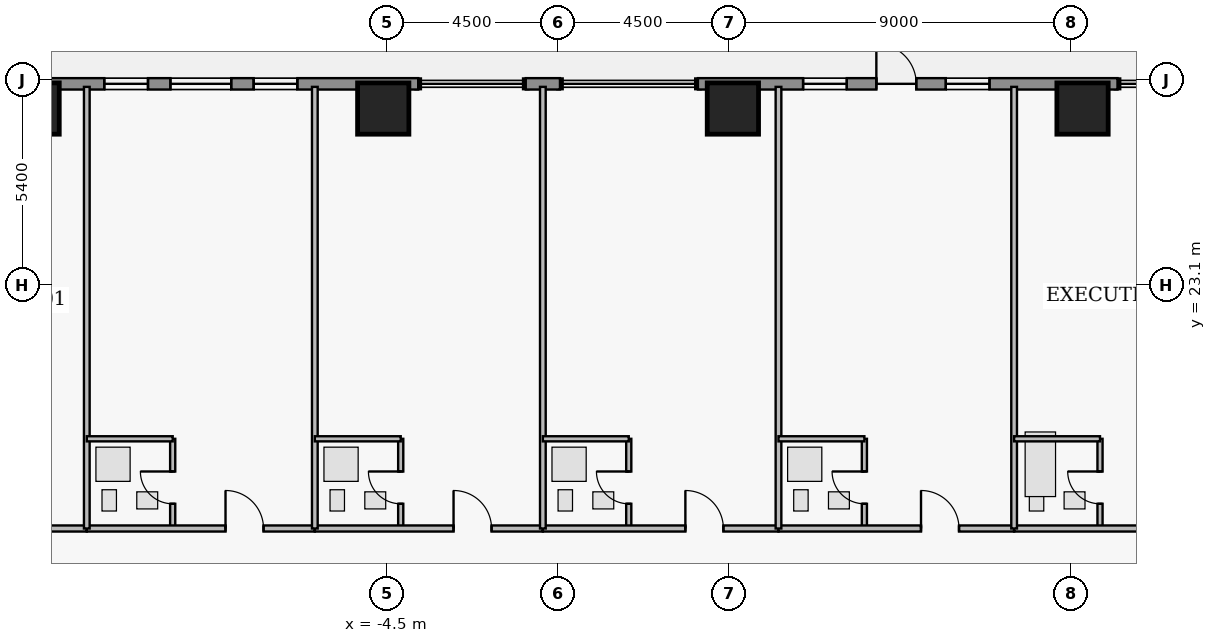
"""IFC4 building model, lengths in metres.
Left out: names, types, materials, properties, quantities, classifications, styles, units other than length and angle.
Written with IfcOpenShell. Run it as: python <this file> out.ifc"""

import sys

from ifc_helpers import new_model, si_unit, direction, frame, frame_2d, origin, origin_2d, place, context, subcontext, project, spatial, rectangle, extrude, element, fill, save


model = new_model("IFC4")
c1 = context("Model", 3, precision=1e-05, world=origin(), true_north=direction((0.0, 1.0)))
c2 = subcontext(c1, "Body", "Model", "MODEL_VIEW")
j1 = project(units=[si_unit("LENGTHUNIT", "METRE"), si_unit("PLANEANGLEUNIT", "RADIAN")], contexts=[c1])
p1 = place(None, origin())
s1 = spatial("IfcSite", under=j1, at=p1, CompositionType="ELEMENT")
p2 = place(p1, origin())
s2 = spatial("IfcBuilding", under=s1, at=p2, CompositionType="ELEMENT")
p3 = place(p2, frame((0.0, 0.0, 99.3)))
s3 = spatial("IfcBuildingStorey", under=s2, at=p3, CompositionType="ELEMENT", Elevation=99.3)
for number, where, z_axis, x_axis in (
    (1, (-13.8, 27.75, 0.0), (0.0, 0.0, 1.0), (1.0, 0.0, 0.0)),
    (2, (-4.6, 27.75, 0.0), (0.0, 0.0, 1.0), (1.0, 0.0, 0.0)),
    (3, (4.6, 27.75, 0.0), (0.0, 0.0, 1.0), (1.0, 0.0, 0.0)),
    (4, (13.8, 27.75, 0.0), (0.0, 0.0, 1.0), (1.0, 0.0, 0.0)),
):
    element("IfcColumn", number, at=place(p3, frame(where, z_axis=z_axis, x_axis=x_axis)), inside=s3, PredefinedType="COLUMN", context=c2, shape_type="SweptSolid", body=[
        extrude(rectangle(XDim=1.35, YDim=1.35, at=origin_2d()), origin(), (0.0, 0.0, 1.0), 3.65),
    ])
p4 = place(p3, frame((-14.72, 28.4, 0.0), z_axis=(0.0, 0.0, 1.0), x_axis=(1.0, 0.0, 0.0)))
e5 = element("IfcWall", 5, at=p4, inside=s3, PredefinedType="STANDARD", context=c2, shape_type="SweptSolid", body=[
    extrude(rectangle(XDim=11.04, YDim=0.3, at=frame_2d((5.52, 0.0))), origin(), (0.0, 0.0, 1.0), 3.43),
])
p5 = place(p4, frame((4.52, 0.0, 0.85)))
e6 = element("IfcOpeningElement", 6, at=p5, cuts=e5, PredefinedType="OPENING", context=c2, shape_type="SweptSolid", body=[
    extrude(rectangle(XDim=1.6, YDim=1.8, at=frame_2d((0.8, 0.9))), frame((0.0, 0.16, 0.0), z_axis=(0.0, -1.0, 0.0), x_axis=(1.0, 0.0, 0.0)), (0.0, 0.0, 1.0), 0.32),
])
p6 = place(p4, frame((2.78, 0.0, 0.95)))
e7 = element("IfcOpeningElement", 7, at=p6, cuts=e5, PredefinedType="OPENING", context=c2, shape_type="SweptSolid", body=[
    extrude(rectangle(XDim=1.15, YDim=1.55, at=frame_2d((0.575, 0.775))), frame((0.0, 0.16, 0.0), z_axis=(0.0, -1.0, 0.0), x_axis=(1.0, 0.0, 0.0)), (0.0, 0.0, 1.0), 0.32),
])
p7 = place(p4, frame((6.71, 0.0, 0.95)))
e8 = element("IfcOpeningElement", 8, at=p7, cuts=e5, PredefinedType="OPENING", context=c2, shape_type="SweptSolid", body=[
    extrude(rectangle(XDim=1.15, YDim=1.55, at=frame_2d((0.575, 0.775))), frame((0.0, 0.16, 0.0), z_axis=(0.0, -1.0, 0.0), x_axis=(1.0, 0.0, 0.0)), (0.0, 0.0, 1.0), 0.32),
])
p8 = place(p3, frame((-0.85, 28.4, 0.0), z_axis=(0.0, 0.0, 1.0), x_axis=(1.0, 0.0, 0.0)))
e9 = element("IfcWall", 9, at=p8, inside=s3, PredefinedType="STANDARD", context=c2, shape_type="SweptSolid", body=[
    extrude(rectangle(XDim=0.9, YDim=0.3, at=frame_2d((0.45, 0.0))), origin(), (0.0, 0.0, 1.0), 3.43),
])
p9 = place(p3, frame((3.68, 28.4, 0.0), z_axis=(0.0, 0.0, 1.0), x_axis=(1.0, 0.0, 0.0)))
e10 = element("IfcWall", 10, at=p9, inside=s3, PredefinedType="STANDARD", context=c2, shape_type="SweptSolid", body=[
    extrude(rectangle(XDim=11.04, YDim=0.3, at=frame_2d((5.52, 0.0))), origin(), (0.0, 0.0, 1.0), 3.43),
])
p10 = place(p9, frame((4.695, 0.0, 0.0)))
e11 = element("IfcOpeningElement", 11, at=p10, cuts=e10, PredefinedType="OPENING", context=c2, shape_type="SweptSolid", body=[
    extrude(rectangle(XDim=1.05, YDim=2.2, at=frame_2d((0.525, 1.1))), frame((0.0, 0.16, 0.0), z_axis=(0.0, -1.0, 0.0), x_axis=(1.0, 0.0, 0.0)), (0.0, 0.0, 1.0), 0.32),
])
p11 = place(p9, frame((2.768, 0.0, 0.95)))
e12 = element("IfcOpeningElement", 12, at=p11, cuts=e10, PredefinedType="OPENING", context=c2, shape_type="SweptSolid", body=[
    extrude(rectangle(XDim=1.15, YDim=1.55, at=frame_2d((0.575, 0.775))), frame((0.0, 0.16, 0.0), z_axis=(0.0, -1.0, 0.0), x_axis=(1.0, 0.0, 0.0)), (0.0, 0.0, 1.0), 0.32),
])
p12 = place(p9, frame((6.522, 0.0, 0.95)))
e13 = element("IfcOpeningElement", 13, at=p12, cuts=e10, PredefinedType="OPENING", context=c2, shape_type="SweptSolid", body=[
    extrude(rectangle(XDim=1.15, YDim=1.55, at=frame_2d((0.575, 0.775))), frame((0.0, 0.16, 0.0), z_axis=(0.0, -1.0, 0.0), x_axis=(1.0, 0.0, 0.0)), (0.0, 0.0, 1.0), 0.32),
])
p13 = place(p3, frame((-20.6, 16.7, 0.0), z_axis=(0.0, 0.0, 1.0), x_axis=(1.0, 0.0, 0.0)))
e14 = element("IfcWall", 14, at=p13, inside=s3, PredefinedType="PARTITIONING", context=c2, shape_type="SweptSolid", body=[
    extrude(rectangle(XDim=8.2, YDim=0.16, at=frame_2d((4.1, 0.0))), origin(), (0.0, 0.0, 1.0), 2.973),
])
p14 = place(p13, frame((4.75, 0.0, 0.0)))
e15 = element("IfcOpeningElement", 15, at=p14, cuts=e14, PredefinedType="OPENING", context=c2, shape_type="SweptSolid", body=[
    extrude(rectangle(XDim=1.0, YDim=2.15, at=frame_2d((0.5, 1.075))), frame((0.0, 0.09, 0.0), z_axis=(0.0, -1.0, 0.0), x_axis=(1.0, 0.0, 0.0)), (0.0, 0.0, 1.0), 0.18),
])
p15 = place(p3, frame((-10.14, 16.7, 0.0), z_axis=(0.0, 0.0, 1.0), x_axis=(0.0, 1.0, 0.0)))
e16 = element("IfcWall", 16, at=p15, inside=s3, PredefinedType="PLUMBINGWALL", context=c2, shape_type="SweptSolid", body=[
    extrude(rectangle(XDim=2.36, YDim=0.135, at=frame_2d((1.18, 0.0))), origin(), (0.0, 0.0, 1.0), 3.43),
])
p16 = place(p15, frame((0.65, 0.0, 0.0)))
e17 = element("IfcOpeningElement", 17, at=p16, cuts=e16, PredefinedType="OPENING", context=c2, shape_type="SweptSolid", body=[
    extrude(rectangle(XDim=0.85, YDim=2.1, at=frame_2d((0.425, 1.05))), frame((0.0, 0.077, 0.0), z_axis=(0.0, -1.0, 0.0), x_axis=(1.0, 0.0, 0.0)), (0.0, 0.0, 1.0), 0.155),
])
p17 = place(p3, frame((-12.4, 16.7, 0.0), z_axis=(0.0, 0.0, 1.0), x_axis=(1.0, 0.0, 0.0)))
e18 = element("IfcWall", 18, at=p17, inside=s3, PredefinedType="PARTITIONING", context=c2, shape_type="SweptSolid", body=[
    extrude(rectangle(XDim=6.0, YDim=0.16, at=frame_2d((3.0, 0.0))), origin(), (0.0, 0.0, 1.0), 2.973),
])
p18 = place(p17, frame((3.65, 0.0, 0.0)))
e19 = element("IfcOpeningElement", 19, at=p18, cuts=e18, PredefinedType="OPENING", context=c2, shape_type="SweptSolid", body=[
    extrude(rectangle(XDim=1.0, YDim=2.15, at=frame_2d((0.5, 1.075))), frame((0.0, 0.09, 0.0), z_axis=(0.0, -1.0, 0.0), x_axis=(1.0, 0.0, 0.0)), (0.0, 0.0, 1.0), 0.18),
])
p19 = place(p3, frame((-4.14, 16.7, 0.0), z_axis=(0.0, 0.0, 1.0), x_axis=(0.0, 1.0, 0.0)))
e20 = element("IfcWall", 20, at=p19, inside=s3, PredefinedType="PLUMBINGWALL", context=c2, shape_type="SweptSolid", body=[
    extrude(rectangle(XDim=2.36, YDim=0.135, at=frame_2d((1.18, 0.0))), origin(), (0.0, 0.0, 1.0), 2.503),
])
p20 = place(p19, frame((0.65, 0.0, 0.0)))
e21 = element("IfcOpeningElement", 21, at=p20, cuts=e20, PredefinedType="OPENING", context=c2, shape_type="SweptSolid", body=[
    extrude(rectangle(XDim=0.85, YDim=2.1, at=frame_2d((0.425, 1.05))), frame((0.0, 0.077, 0.0), z_axis=(0.0, -1.0, 0.0), x_axis=(1.0, 0.0, 0.0)), (0.0, 0.0, 1.0), 0.155),
])
p21 = place(p3, frame((-6.4, 16.7, 0.0), z_axis=(0.0, 0.0, 1.0), x_axis=(1.0, 0.0, 0.0)))
e22 = element("IfcWall", 22, at=p21, inside=s3, PredefinedType="PARTITIONING", context=c2, shape_type="SweptSolid", body=[
    extrude(rectangle(XDim=6.0, YDim=0.16, at=frame_2d((3.0, 0.0))), origin(), (0.0, 0.0, 1.0), 2.973),
])
p22 = place(p21, frame((3.65, 0.0, 0.0)))
e23 = element("IfcOpeningElement", 23, at=p22, cuts=e22, PredefinedType="OPENING", context=c2, shape_type="SweptSolid", body=[
    extrude(rectangle(XDim=1.0, YDim=2.15, at=frame_2d((0.5, 1.075))), frame((0.0, 0.09, 0.0), z_axis=(0.0, -1.0, 0.0), x_axis=(1.0, 0.0, 0.0)), (0.0, 0.0, 1.0), 0.18),
])
p23 = place(p3, frame((1.86, 16.7, 0.0), z_axis=(0.0, 0.0, 1.0), x_axis=(0.0, 1.0, 0.0)))
e24 = element("IfcWall", 24, at=p23, inside=s3, PredefinedType="PLUMBINGWALL", context=c2, shape_type="SweptSolid", body=[
    extrude(rectangle(XDim=2.36, YDim=0.135, at=frame_2d((1.18, 0.0))), origin(), (0.0, 0.0, 1.0), 3.43),
])
p24 = place(p23, frame((0.65, 0.0, 0.0)))
e25 = element("IfcOpeningElement", 25, at=p24, cuts=e24, PredefinedType="OPENING", context=c2, shape_type="SweptSolid", body=[
    extrude(rectangle(XDim=0.85, YDim=2.1, at=frame_2d((0.425, 1.05))), frame((0.0, 0.077, 0.0), z_axis=(0.0, -1.0, 0.0), x_axis=(1.0, 0.0, 0.0)), (0.0, 0.0, 1.0), 0.155),
])
p25 = place(p3, frame((-0.4, 16.7, 0.0), z_axis=(0.0, 0.0, 1.0), x_axis=(1.0, 0.0, 0.0)))
e26 = element("IfcWall", 26, at=p25, inside=s3, PredefinedType="PARTITIONING", context=c2, shape_type="SweptSolid", body=[
    extrude(rectangle(XDim=6.2, YDim=0.16, at=frame_2d((3.1, 0.0))), origin(), (0.0, 0.0, 1.0), 2.973),
])
p26 = place(p25, frame((3.75, 0.0, 0.0)))
e27 = element("IfcOpeningElement", 27, at=p26, cuts=e26, PredefinedType="OPENING", context=c2, shape_type="SweptSolid", body=[
    extrude(rectangle(XDim=1.0, YDim=2.15, at=frame_2d((0.5, 1.075))), frame((0.0, 0.09, 0.0), z_axis=(0.0, -1.0, 0.0), x_axis=(1.0, 0.0, 0.0)), (0.0, 0.0, 1.0), 0.18),
])
p27 = place(p3, frame((8.06, 16.7, 0.0), z_axis=(0.0, 0.0, 1.0), x_axis=(0.0, 1.0, 0.0)))
e28 = element("IfcWall", 28, at=p27, inside=s3, PredefinedType="PLUMBINGWALL", context=c2, shape_type="SweptSolid", body=[
    extrude(rectangle(XDim=2.36, YDim=0.135, at=frame_2d((1.18, 0.0))), origin(), (0.0, 0.0, 1.0), 3.43),
])
p28 = place(p27, frame((0.65, 0.0, 0.0)))
e29 = element("IfcOpeningElement", 29, at=p28, cuts=e28, PredefinedType="OPENING", context=c2, shape_type="SweptSolid", body=[
    extrude(rectangle(XDim=0.85, YDim=2.1, at=frame_2d((0.425, 1.05))), frame((0.0, 0.077, 0.0), z_axis=(0.0, -1.0, 0.0), x_axis=(1.0, 0.0, 0.0)), (0.0, 0.0, 1.0), 0.155),
])
p29 = place(p3, frame((5.8, 16.7, 0.0), z_axis=(0.0, 0.0, 1.0), x_axis=(1.0, 0.0, 0.0)))
e30 = element("IfcWall", 30, at=p29, inside=s3, PredefinedType="PARTITIONING", context=c2, shape_type="SweptSolid", body=[
    extrude(rectangle(XDim=6.2, YDim=0.16, at=frame_2d((3.1, 0.0))), origin(), (0.0, 0.0, 1.0), 2.973),
])
p30 = place(p29, frame((3.75, 0.0, 0.0)))
e31 = element("IfcOpeningElement", 31, at=p30, cuts=e30, PredefinedType="OPENING", context=c2, shape_type="SweptSolid", body=[
    extrude(rectangle(XDim=1.0, YDim=2.15, at=frame_2d((0.5, 1.075))), frame((0.0, 0.09, 0.0), z_axis=(0.0, -1.0, 0.0), x_axis=(1.0, 0.0, 0.0)), (0.0, 0.0, 1.0), 0.18),
])
p31 = place(p3, frame((14.26, 16.7, 0.0), z_axis=(0.0, 0.0, 1.0), x_axis=(0.0, 1.0, 0.0)))
e32 = element("IfcWall", 32, at=p31, inside=s3, PredefinedType="PLUMBINGWALL", context=c2, shape_type="SweptSolid", body=[
    extrude(rectangle(XDim=2.36, YDim=0.135, at=frame_2d((1.18, 0.0))), origin(), (0.0, 0.0, 1.0), 2.503),
])
p32 = place(p31, frame((0.65, 0.0, 0.0)))
e33 = element("IfcOpeningElement", 33, at=p32, cuts=e32, PredefinedType="OPENING", context=c2, shape_type="SweptSolid", body=[
    extrude(rectangle(XDim=0.85, YDim=2.1, at=frame_2d((0.425, 1.05))), frame((0.0, 0.077, 0.0), z_axis=(0.0, -1.0, 0.0), x_axis=(1.0, 0.0, 0.0)), (0.0, 0.0, 1.0), 0.155),
])
p33 = place(p3, frame((12.0, 16.7, 0.0), z_axis=(0.0, 0.0, 1.0), x_axis=(1.0, 0.0, 0.0)))
e34 = element("IfcWall", 34, at=p33, inside=s3, PredefinedType="PARTITIONING", context=c2, shape_type="SweptSolid", body=[
    extrude(rectangle(XDim=8.6, YDim=0.16, at=frame_2d((4.3, 0.0))), origin(), (0.0, 0.0, 1.0), 2.973),
])
p34 = place(p33, frame((4.825, 0.0, 0.0)))
e35 = element("IfcOpeningElement", 35, at=p34, cuts=e34, PredefinedType="OPENING", context=c2, shape_type="SweptSolid", body=[
    extrude(rectangle(XDim=1.0, YDim=2.15, at=frame_2d((0.5, 1.075))), frame((0.0, 0.09, 0.0), z_axis=(0.0, -1.0, 0.0), x_axis=(1.0, 0.0, 0.0)), (0.0, 0.0, 1.0), 0.18),
])
p35 = place(p3, frame((-12.4, 16.7, 0.0), z_axis=(0.0, 0.0, 1.0), x_axis=(0.0, 1.0, 0.0)))
e36 = element("IfcWall", 36, at=p35, inside=s3, PredefinedType="PARTITIONING", context=c2, shape_type="SweptSolid", body=[
    extrude(rectangle(XDim=11.62, YDim=0.15, at=frame_2d((5.81, 0.0))), origin(), (0.0, 0.0, 1.0), 3.43),
])
p36 = place(p3, frame((-12.4, 19.06, 0.0), z_axis=(0.0, 0.0, 1.0), x_axis=(1.0, 0.0, 0.0)))
e37 = element("IfcWall", 37, at=p36, inside=s3, PredefinedType="PLUMBINGWALL", context=c2, shape_type="SweptSolid", body=[
    extrude(rectangle(XDim=2.26, YDim=0.135, at=frame_2d((1.13, 0.0))), origin(), (0.0, 0.0, 1.0), 2.973),
])
p37 = place(p3, frame((-6.4, 16.7, 0.0), z_axis=(0.0, 0.0, 1.0), x_axis=(0.0, 1.0, 0.0)))
e38 = element("IfcWall", 38, at=p37, inside=s3, PredefinedType="PARTITIONING", context=c2, shape_type="SweptSolid", body=[
    extrude(rectangle(XDim=11.62, YDim=0.15, at=frame_2d((5.81, 0.0))), origin(), (0.0, 0.0, 1.0), 3.43),
])
p38 = place(p3, frame((-6.4, 19.06, 0.0), z_axis=(0.0, 0.0, 1.0), x_axis=(1.0, 0.0, 0.0)))
e39 = element("IfcWall", 39, at=p38, inside=s3, PredefinedType="PLUMBINGWALL", context=c2, shape_type="SweptSolid", body=[
    extrude(rectangle(XDim=2.26, YDim=0.135, at=frame_2d((1.13, 0.0))), origin(), (0.0, 0.0, 1.0), 2.973),
])
p39 = place(p3, frame((-0.4, 16.7, 0.0), z_axis=(0.0, 0.0, 1.0), x_axis=(0.0, 1.0, 0.0)))
e40 = element("IfcWall", 40, at=p39, inside=s3, PredefinedType="PARTITIONING", context=c2, shape_type="SweptSolid", body=[
    extrude(rectangle(XDim=11.62, YDim=0.15, at=frame_2d((5.81, 0.0))), origin(), (0.0, 0.0, 1.0), 3.43),
])
p40 = place(p3, frame((-0.4, 19.06, 0.0), z_axis=(0.0, 0.0, 1.0), x_axis=(1.0, 0.0, 0.0)))
e41 = element("IfcWall", 41, at=p40, inside=s3, PredefinedType="PLUMBINGWALL", context=c2, shape_type="SweptSolid", body=[
    extrude(rectangle(XDim=2.26, YDim=0.135, at=frame_2d((1.13, 0.0))), origin(), (0.0, 0.0, 1.0), 2.973),
])
p41 = place(p3, frame((5.8, 16.7, 0.0), z_axis=(0.0, 0.0, 1.0), x_axis=(0.0, 1.0, 0.0)))
e42 = element("IfcWall", 42, at=p41, inside=s3, PredefinedType="PARTITIONING", context=c2, shape_type="SweptSolid", body=[
    extrude(rectangle(XDim=11.62, YDim=0.15, at=frame_2d((5.81, 0.0))), origin(), (0.0, 0.0, 1.0), 3.43),
])
p42 = place(p3, frame((5.8, 19.06, 0.0), z_axis=(0.0, 0.0, 1.0), x_axis=(1.0, 0.0, 0.0)))
e43 = element("IfcWall", 43, at=p42, inside=s3, PredefinedType="PLUMBINGWALL", context=c2, shape_type="SweptSolid", body=[
    extrude(rectangle(XDim=2.26, YDim=0.135, at=frame_2d((1.13, 0.0))), origin(), (0.0, 0.0, 1.0), 2.973),
])
p43 = place(p3, frame((12.0, 16.7, 0.0), z_axis=(0.0, 0.0, 1.0), x_axis=(0.0, 1.0, 0.0)))
e44 = element("IfcWall", 44, at=p43, inside=s3, PredefinedType="PARTITIONING", context=c2, shape_type="SweptSolid", body=[
    extrude(rectangle(XDim=11.62, YDim=0.15, at=frame_2d((5.81, 0.0))), origin(), (0.0, 0.0, 1.0), 3.43),
])
p44 = place(p3, frame((12.0, 19.06, 0.0), z_axis=(0.0, 0.0, 1.0), x_axis=(1.0, 0.0, 0.0)))
e45 = element("IfcWall", 45, at=p44, inside=s3, PredefinedType="PLUMBINGWALL", context=c2, shape_type="SweptSolid", body=[
    extrude(rectangle(XDim=2.26, YDim=0.135, at=frame_2d((1.13, 0.0))), origin(), (0.0, 0.0, 1.0), 2.973),
])
p45 = place(p5, origin())
e46 = element("IfcWindow", 46, at=p45, inside=s3, PartitioningType="SINGLE_PANEL", PredefinedType="WINDOW", context=c2, shape_type="SweptSolid", body=[
    extrude(rectangle(XDim=1.6, YDim=1.8, at=frame_2d((0.8, 0.9))), frame((0.0, 0.03, 0.0), z_axis=(0.0, -1.0, 0.0), x_axis=(1.0, 0.0, 0.0)), (0.0, 0.0, 1.0), 0.06),
])
fill(e6, e46)
p46 = place(p6, origin())
e47 = element("IfcWindow", 47, at=p46, inside=s3, PartitioningType="SINGLE_PANEL", PredefinedType="WINDOW", context=c2, shape_type="SweptSolid", body=[
    extrude(rectangle(XDim=1.15, YDim=1.55, at=frame_2d((0.575, 0.775))), frame((0.0, 0.03, 0.0), z_axis=(0.0, -1.0, 0.0), x_axis=(1.0, 0.0, 0.0)), (0.0, 0.0, 1.0), 0.06),
])
fill(e7, e47)
p47 = place(p7, origin())
e48 = element("IfcWindow", 48, at=p47, inside=s3, PartitioningType="SINGLE_PANEL", PredefinedType="WINDOW", context=c2, shape_type="SweptSolid", body=[
    extrude(rectangle(XDim=1.15, YDim=1.55, at=frame_2d((0.575, 0.775))), frame((0.0, 0.03, 0.0), z_axis=(0.0, -1.0, 0.0), x_axis=(1.0, 0.0, 0.0)), (0.0, 0.0, 1.0), 0.06),
])
fill(e8, e48)
p48 = place(p10, origin())
e49 = element("IfcDoor", 49, at=p48, inside=s3, OperationType="SINGLE_SWING_LEFT", PredefinedType="DOOR", context=c2, shape_type="SweptSolid", body=[
    extrude(rectangle(XDim=1.05, YDim=2.2, at=frame_2d((0.525, 1.1))), frame((0.0, 0.025, 0.0), z_axis=(0.0, -1.0, 0.0), x_axis=(1.0, 0.0, 0.0)), (0.0, 0.0, 1.0), 0.05),
])
fill(e11, e49)
p49 = place(p11, origin())
e50 = element("IfcWindow", 50, at=p49, inside=s3, PartitioningType="SINGLE_PANEL", PredefinedType="WINDOW", context=c2, shape_type="SweptSolid", body=[
    extrude(rectangle(XDim=1.15, YDim=1.55, at=frame_2d((0.575, 0.775))), frame((0.0, 0.03, 0.0), z_axis=(0.0, -1.0, 0.0), x_axis=(1.0, 0.0, 0.0)), (0.0, 0.0, 1.0), 0.06),
])
fill(e12, e50)
p50 = place(p12, origin())
e51 = element("IfcWindow", 51, at=p50, inside=s3, PartitioningType="SINGLE_PANEL", PredefinedType="WINDOW", context=c2, shape_type="SweptSolid", body=[
    extrude(rectangle(XDim=1.15, YDim=1.55, at=frame_2d((0.575, 0.775))), frame((0.0, 0.03, 0.0), z_axis=(0.0, -1.0, 0.0), x_axis=(1.0, 0.0, 0.0)), (0.0, 0.0, 1.0), 0.06),
])
fill(e13, e51)
p51 = place(p16, origin())
e52 = element("IfcDoor", 52, at=p51, inside=s3, OperationType="SINGLE_SWING_RIGHT", PredefinedType="DOOR", context=c2, shape_type="SweptSolid", body=[
    extrude(rectangle(XDim=0.85, YDim=2.1, at=frame_2d((0.425, 1.05))), frame((0.0, 0.025, 0.0), z_axis=(0.0, -1.0, 0.0), x_axis=(1.0, 0.0, 0.0)), (0.0, 0.0, 1.0), 0.05),
])
fill(e17, e52)
p52 = place(p18, origin())
e53 = element("IfcDoor", 53, at=p52, inside=s3, OperationType="SINGLE_SWING_LEFT", PredefinedType="DOOR", context=c2, shape_type="SweptSolid", body=[
    extrude(rectangle(XDim=1.0, YDim=2.15, at=frame_2d((0.5, 1.075))), frame((0.0, 0.025, 0.0), z_axis=(0.0, -1.0, 0.0), x_axis=(1.0, 0.0, 0.0)), (0.0, 0.0, 1.0), 0.05),
])
fill(e19, e53)
p53 = place(p20, origin())
e54 = element("IfcDoor", 54, at=p53, inside=s3, OperationType="SINGLE_SWING_RIGHT", PredefinedType="DOOR", context=c2, shape_type="SweptSolid", body=[
    extrude(rectangle(XDim=0.85, YDim=2.1, at=frame_2d((0.425, 1.05))), frame((0.0, 0.025, 0.0), z_axis=(0.0, -1.0, 0.0), x_axis=(1.0, 0.0, 0.0)), (0.0, 0.0, 1.0), 0.05),
])
fill(e21, e54)
p54 = place(p22, origin())
e55 = element("IfcDoor", 55, at=p54, inside=s3, OperationType="SINGLE_SWING_LEFT", PredefinedType="DOOR", context=c2, shape_type="SweptSolid", body=[
    extrude(rectangle(XDim=1.0, YDim=2.15, at=frame_2d((0.5, 1.075))), frame((0.0, 0.025, 0.0), z_axis=(0.0, -1.0, 0.0), x_axis=(1.0, 0.0, 0.0)), (0.0, 0.0, 1.0), 0.05),
])
fill(e23, e55)
p55 = place(p24, origin())
e56 = element("IfcDoor", 56, at=p55, inside=s3, OperationType="SINGLE_SWING_RIGHT", PredefinedType="DOOR", context=c2, shape_type="SweptSolid", body=[
    extrude(rectangle(XDim=0.85, YDim=2.1, at=frame_2d((0.425, 1.05))), frame((0.0, 0.025, 0.0), z_axis=(0.0, -1.0, 0.0), x_axis=(1.0, 0.0, 0.0)), (0.0, 0.0, 1.0), 0.05),
])
fill(e25, e56)
p56 = place(p26, origin())
e57 = element("IfcDoor", 57, at=p56, inside=s3, OperationType="SINGLE_SWING_LEFT", PredefinedType="DOOR", context=c2, shape_type="SweptSolid", body=[
    extrude(rectangle(XDim=1.0, YDim=2.15, at=frame_2d((0.5, 1.075))), frame((0.0, 0.025, 0.0), z_axis=(0.0, -1.0, 0.0), x_axis=(1.0, 0.0, 0.0)), (0.0, 0.0, 1.0), 0.05),
])
fill(e27, e57)
p57 = place(p28, origin())
e58 = element("IfcDoor", 58, at=p57, inside=s3, OperationType="SINGLE_SWING_RIGHT", PredefinedType="DOOR", context=c2, shape_type="SweptSolid", body=[
    extrude(rectangle(XDim=0.85, YDim=2.1, at=frame_2d((0.425, 1.05))), frame((0.0, 0.025, 0.0), z_axis=(0.0, -1.0, 0.0), x_axis=(1.0, 0.0, 0.0)), (0.0, 0.0, 1.0), 0.05),
])
fill(e29, e58)
p58 = place(p30, origin())
e59 = element("IfcDoor", 59, at=p58, inside=s3, OperationType="SINGLE_SWING_LEFT", PredefinedType="DOOR", context=c2, shape_type="SweptSolid", body=[
    extrude(rectangle(XDim=1.0, YDim=2.15, at=frame_2d((0.5, 1.075))), frame((0.0, 0.025, 0.0), z_axis=(0.0, -1.0, 0.0), x_axis=(1.0, 0.0, 0.0)), (0.0, 0.0, 1.0), 0.05),
])
fill(e31, e59)
p59 = place(p32, origin())
e60 = element("IfcDoor", 60, at=p59, inside=s3, OperationType="SINGLE_SWING_RIGHT", PredefinedType="DOOR", context=c2, shape_type="SweptSolid", body=[
    extrude(rectangle(XDim=0.85, YDim=2.1, at=frame_2d((0.425, 1.05))), frame((0.0, 0.025, 0.0), z_axis=(0.0, -1.0, 0.0), x_axis=(1.0, 0.0, 0.0)), (0.0, 0.0, 1.0), 0.05),
])
fill(e33, e60)
save(model, sys.argv[1])
